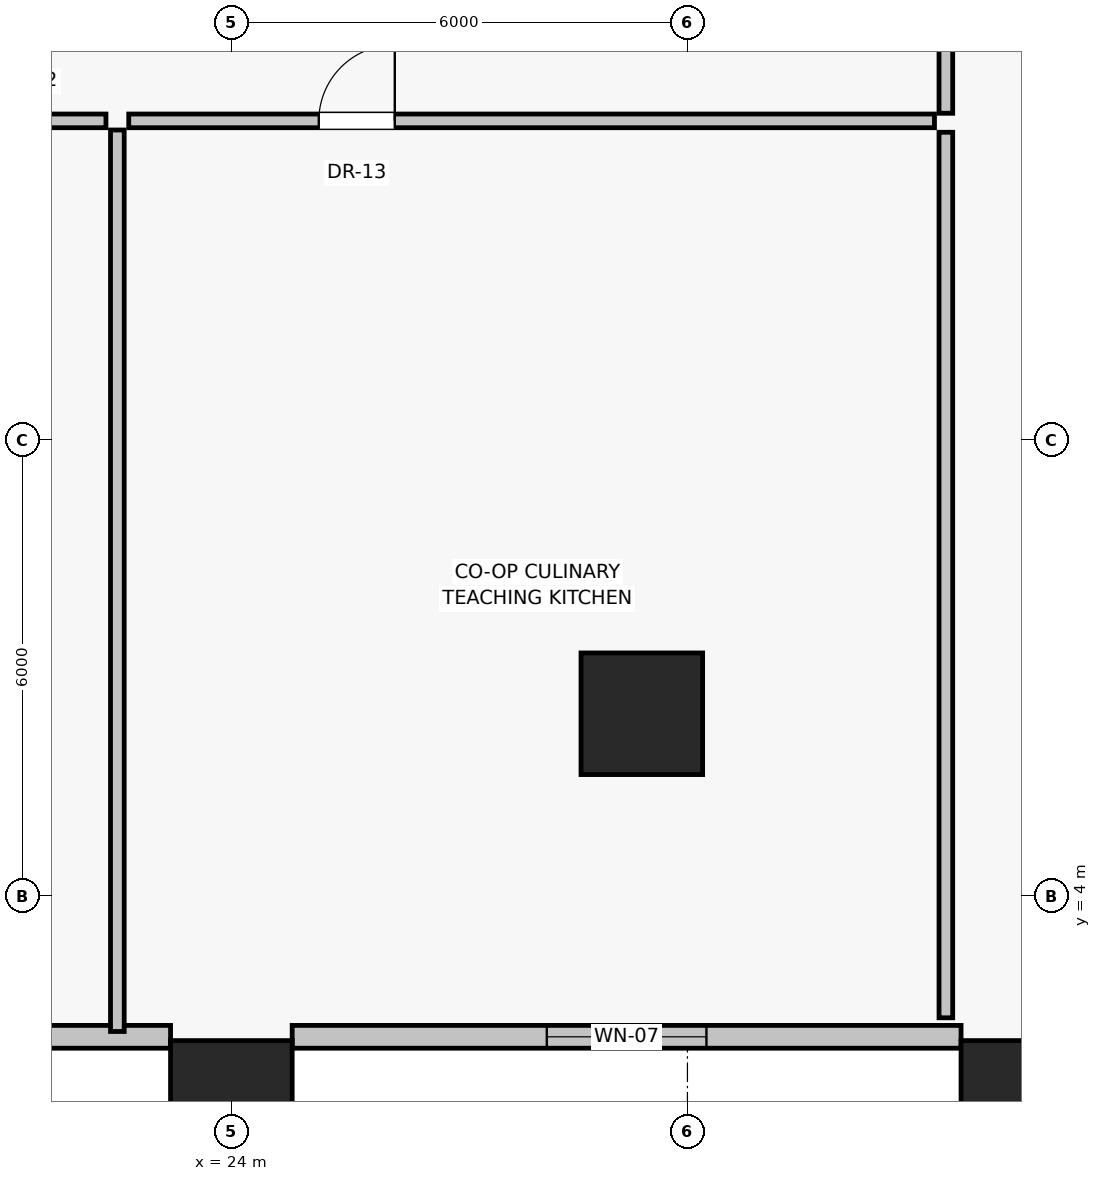
"""IFC4 building model, lengths in metres.
Left out: names, types, materials, properties, quantities, classifications, styles, units other than length and angle.
Written with IfcOpenShell. Run it as: python <this file> out.ifc"""

import sys

from ifc_helpers import new_model, si_unit, direction, frame, frame_2d, origin, origin_2d, place, context, subcontext, project, spatial, rectangle, extrude, source, transform, mapped, element, fill, save


model = new_model("IFC4")
c1 = context("Model", 3, precision=1e-05, world=origin(), true_north=direction((0.0, 1.0)))
c2 = subcontext(c1, "Body", "Model", "MODEL_VIEW")
j1 = project(units=[si_unit("LENGTHUNIT", "METRE"), si_unit("PLANEANGLEUNIT", "RADIAN")], contexts=[c1])
p1 = place(None, origin())
s1 = spatial("IfcSite", under=j1, at=p1, CompositionType="ELEMENT")
p2 = place(p1, origin())
s2 = spatial("IfcBuilding", under=s1, at=p2, CompositionType="ELEMENT")
p3 = place(p2, frame((0.0, 0.0, 14.0)))
s3 = spatial("IfcBuildingStorey", under=s2, at=p3, CompositionType="ELEMENT", Elevation=14.0)
for number, where, z_axis, x_axis in (
    (1, (24.0, 1.3, 0.0), (0.0, 0.0, 1.0), (1.0, 0.0, 0.0)),
    (2, (34.4, 1.3, 0.0), (0.0, 0.0, 1.0), (1.0, 0.0, 0.0)),
    (3, (29.4, 6.4, 0.0), (0.0, 0.0, 1.0), (1.0, 0.0, 0.0)),
):
    element("IfcColumn", number, at=place(p3, frame(where, z_axis=z_axis, x_axis=x_axis)), inside=s3, PredefinedType="COLUMN", context=c2, shape_type="SweptSolid", body=[
        extrude(rectangle(XDim=1.6, YDim=1.6, at=origin_2d()), origin(), (0.0, 0.0, 1.0), 4.4),
    ])
p4 = place(p3, frame((14.4, 2.15, 0.0), z_axis=(0.0, 0.0, 1.0), x_axis=(1.0, 0.0, 0.0)))
e4 = element("IfcWall", 4, at=p4, inside=s3, PredefinedType="SOLIDWALL", context=c2, shape_type="SweptSolid", body=[
    extrude(rectangle(XDim=8.8, YDim=0.3, at=frame_2d((4.4, 0.0))), origin(), (0.0, 0.0, 1.0), 3.0),
])
p5 = place(p4, frame((3.35, 0.0, 0.85)))
e5 = element("IfcOpeningElement", 5, at=p5, cuts=e4, PredefinedType="OPENING", context=c2, shape_type="SweptSolid", body=[
    extrude(rectangle(XDim=2.1, YDim=1.75, at=frame_2d((1.05, 0.875))), frame((0.0, 0.16, 0.0), z_axis=(0.0, -1.0, 0.0), x_axis=(1.0, 0.0, 0.0)), (0.0, 0.0, 1.0), 0.32),
])
p6 = place(p3, frame((24.8, 2.15, 0.0), z_axis=(0.0, 0.0, 1.0), x_axis=(1.0, 0.0, 0.0)))
e6 = element("IfcWall", 6, at=p6, inside=s3, PredefinedType="SOLIDWALL", context=c2, shape_type="SweptSolid", body=[
    extrude(rectangle(XDim=8.8, YDim=0.3, at=frame_2d((4.4, 0.0))), origin(), (0.0, 0.0, 1.0), 3.0),
])
p7 = place(p6, frame((3.35, 0.0, 0.85)))
e7 = element("IfcOpeningElement", 7, at=p7, cuts=e6, PredefinedType="OPENING", context=c2, shape_type="SweptSolid", body=[
    extrude(rectangle(XDim=2.1, YDim=1.75, at=frame_2d((1.05, 0.875))), frame((0.0, 0.16, 0.0), z_axis=(0.0, -1.0, 0.0), x_axis=(1.0, 0.0, 0.0)), (0.0, 0.0, 1.0), 0.32),
])
p8 = place(p3, frame((14.75, 14.2, 0.0), z_axis=(0.0, 0.0, 1.0), x_axis=(1.0, 0.0, 0.0)))
e8 = element("IfcWall", 8, at=p8, inside=s3, PredefinedType="PARTITIONING", context=c2, shape_type="SweptSolid", body=[
    extrude(rectangle(XDim=7.6, YDim=0.18, at=frame_2d((3.8, 0.0))), origin(), (0.0, 0.0, 1.0), 4.1),
])
p9 = place(p8, frame((2.5, 0.0, 0.0)))
e9 = element("IfcOpeningElement", 9, at=p9, cuts=e8, PredefinedType="OPENING", context=c2, shape_type="SweptSolid", body=[
    extrude(rectangle(XDim=1.0, YDim=2.01, at=frame_2d((0.5, 1.005))), frame((0.0, 0.1, 0.0), z_axis=(0.0, -1.0, 0.0), x_axis=(1.0, 0.0, 0.0)), (0.0, 0.0, 1.0), 0.2),
])
p10 = place(p3, frame((22.65, 14.2, 0.0), z_axis=(0.0, 0.0, 1.0), x_axis=(1.0, 0.0, 0.0)))
e10 = element("IfcWall", 10, at=p10, inside=s3, PredefinedType="PARTITIONING", context=c2, shape_type="SweptSolid", body=[
    extrude(rectangle(XDim=10.6, YDim=0.18, at=frame_2d((5.3, 0.0))), origin(), (0.0, 0.0, 1.0), 4.1),
])
p11 = place(p10, frame((2.5, 0.0, 0.0)))
e11 = element("IfcOpeningElement", 11, at=p11, cuts=e10, PredefinedType="OPENING", context=c2, shape_type="SweptSolid", body=[
    extrude(rectangle(XDim=1.0, YDim=2.01, at=frame_2d((0.5, 1.005))), frame((0.0, 0.1, 0.0), z_axis=(0.0, -1.0, 0.0), x_axis=(1.0, 0.0, 0.0)), (0.0, 0.0, 1.0), 0.2),
])
p12 = place(p3, frame((22.5, 2.22, 0.0), z_axis=(0.0, 0.0, 1.0), x_axis=(0.0, 1.0, 0.0)))
e12 = element("IfcWall", 12, at=p12, inside=s3, PredefinedType="PARTITIONING", context=c2, shape_type="SweptSolid", body=[
    extrude(rectangle(XDim=11.86, YDim=0.18, at=frame_2d((5.93, 0.0))), origin(), (0.0, 0.0, 1.0), 4.1),
])
p13 = place(p3, frame((33.4, 2.4, 0.0), z_axis=(0.0, 0.0, 1.0), x_axis=(0.0, 1.0, 0.0)))
e13 = element("IfcWall", 13, at=p13, inside=s3, PredefinedType="PARTITIONING", context=c2, shape_type="SweptSolid", body=[
    extrude(rectangle(XDim=11.65, YDim=0.18, at=frame_2d((5.825, 0.0))), origin(), (0.0, 0.0, 1.0), 4.1),
])
p14 = place(p3, frame((33.4, 14.3, 0.0), z_axis=(0.0, 0.0, 1.0), x_axis=(0.0, 1.0, 0.0)))
e14 = element("IfcWall", 14, at=p14, inside=s3, PredefinedType="PARTITIONING", context=c2, shape_type="SweptSolid", body=[
    extrude(rectangle(XDim=6.05, YDim=0.18, at=frame_2d((3.025, 0.0))), origin(), (0.0, 0.0, 1.0), 4.1),
])
p15 = place(p14, frame((2.2, 0.0, 0.0)))
e15 = element("IfcOpeningElement", 15, at=p15, cuts=e14, PredefinedType="OPENING", context=c2, shape_type="SweptSolid", body=[
    extrude(rectangle(XDim=1.0, YDim=2.01, at=frame_2d((0.5, 1.005))), frame((0.0, 0.1, 0.0), z_axis=(0.0, -1.0, 0.0), x_axis=(1.0, 0.0, 0.0)), (0.0, 0.0, 1.0), 0.2),
])
m1 = source(origin(), c2, "Body", "SweptSolid", [
    extrude(rectangle(XDim=2.1, YDim=1.75, at=frame_2d((1.05, 0.875))), frame((0.0, 0.03, 0.0), z_axis=(0.0, -1.0, 0.0), x_axis=(1.0, 0.0, 0.0)), (0.0, 0.0, 1.0), 0.06),
])
p16 = place(p7, origin())
e16 = element("IfcWindow", 16, at=p16, inside=s3, PartitioningType="DOUBLE_PANEL_VERTICAL", PredefinedType="WINDOW", context=c2, shape_type="MappedRepresentation", body=[
    mapped(m1, transform((0.0, 0.0, 0.0), scale=1.0)),
])
fill(e7, e16)
m2 = source(origin(), c2, "Body", "SweptSolid", [
    extrude(rectangle(XDim=1.0, YDim=2.01, at=frame_2d((0.5, 1.005))), frame((0.0, 0.025, 0.0), z_axis=(0.0, -1.0, 0.0), x_axis=(1.0, 0.0, 0.0)), (0.0, 0.0, 1.0), 0.05),
])
p17 = place(p11, origin())
e17 = element("IfcDoor", 17, at=p17, inside=s3, OperationType="SINGLE_SWING_RIGHT", PredefinedType="DOOR", context=c2, shape_type="MappedRepresentation", body=[
    mapped(m2, transform((0.0, 0.0, 0.0), scale=1.0)),
])
fill(e11, e17)
save(model, sys.argv[1])
